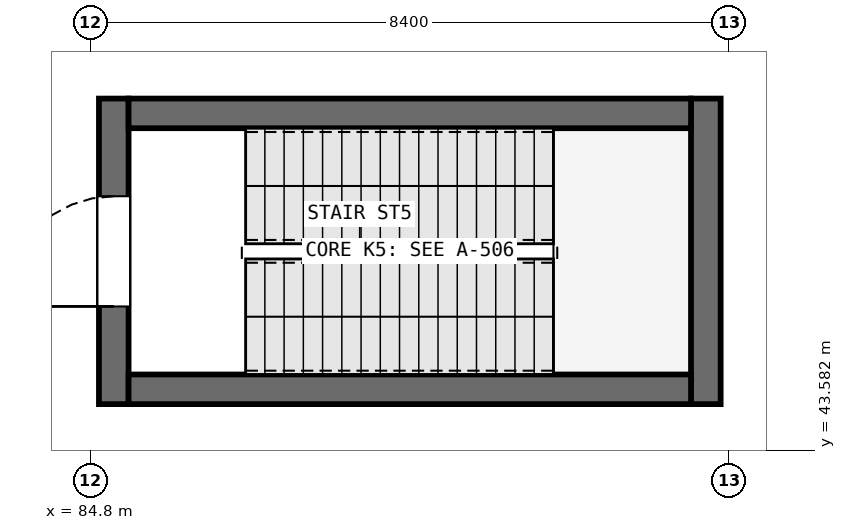
"""IFC4 building model, lengths in metres.
Left out: names, types, materials, properties, quantities, classifications, styles, units other than length and angle.
Written with IfcOpenShell. Run it as: python <this file> out.ifc"""

import sys

from ifc_helpers import new_model, si_unit, direction, frame, frame_2d, origin, place, context, subcontext, project, spatial, rectangle, extrude, element, fill, save


model = new_model("IFC4")
c1 = context("Model", 3, precision=1e-05, world=origin(), true_north=direction((0.0, 1.0)))
c2 = subcontext(c1, "Body", "Model", "MODEL_VIEW")
j1 = project(units=[si_unit("LENGTHUNIT", "METRE"), si_unit("PLANEANGLEUNIT", "RADIAN")], contexts=[c1])
p1 = place(None, origin())
s1 = spatial("IfcSite", under=j1, at=p1, CompositionType="ELEMENT")
p2 = place(p1, origin())
s2 = spatial("IfcBuilding", under=s1, at=p2, CompositionType="ELEMENT")
p3 = place(p2, origin())
s3 = spatial("IfcBuildingStorey", under=s2, at=p3, CompositionType="ELEMENT", Elevation=0.0)
p4 = place(p3, frame((85.105, 44.19, 0.0), z_axis=(0.0, 0.0, 1.0), x_axis=(0.0, 1.0, 0.0)))
e1 = element("IfcWall", 1, at=p4, inside=s3, PredefinedType="SHEAR", context=c2, shape_type="SweptSolid", body=[
    extrude(rectangle(XDim=4.02, YDim=0.39, at=frame_2d((2.01, 0.0))), origin(), (0.0, 0.0, 1.0), 5.1),
])
p5 = place(p4, frame((1.285, 0.0, 0.0)))
e2 = element("IfcOpeningElement", 2, at=p5, cuts=e1, PredefinedType="OPENING", context=c2, shape_type="SweptSolid", body=[
    extrude(rectangle(XDim=1.45, YDim=2.2, at=frame_2d((0.725, 1.1))), frame((0.0, 0.205, 0.0), z_axis=(0.0, -1.0, 0.0), x_axis=(1.0, 0.0, 0.0)), (0.0, 0.0, 1.0), 0.41),
])
p6 = place(p3, frame((92.895, 44.19, 0.0), z_axis=(0.0, 0.0, 1.0), x_axis=(0.0, 1.0, 0.0)))
e3 = element("IfcWall", 3, at=p6, inside=s3, PredefinedType="SHEAR", context=c2, shape_type="SweptSolid", body=[
    extrude(rectangle(XDim=4.02, YDim=0.39, at=frame_2d((2.01, 0.0))), origin(), (0.0, 0.0, 1.0), 5.1),
])
for number, where, z_axis, x_axis in (
    (4, (85.3, 44.385, 0.0), (0.0, 0.0, 1.0), (1.0, 0.0, 0.0)),
    (5, (85.3, 48.015, 0.0), (0.0, 0.0, 1.0), (1.0, 0.0, 0.0)),
):
    element("IfcWall", number, at=place(p3, frame(where, z_axis=z_axis, x_axis=x_axis)), inside=s3, PredefinedType="SHEAR", context=c2, shape_type="SweptSolid", body=[
        extrude(rectangle(XDim=7.4, YDim=0.39, at=frame_2d((3.7, 0.0))), origin(), (0.0, 0.0, 1.0), 5.1),
    ])
p7 = place(p5, origin())
e6 = element("IfcDoor", 6, at=p7, inside=s3, OperationType="SINGLE_SWING_LEFT", PredefinedType="DOOR", context=c2, shape_type="SweptSolid", body=[
    extrude(rectangle(XDim=1.45, YDim=2.2, at=frame_2d((0.725, 1.1))), frame((0.0, 0.025, 0.0), z_axis=(0.0, -1.0, 0.0), x_axis=(1.0, 0.0, 0.0)), (0.0, 0.0, 1.0), 0.05),
])
fill(e2, e6)
save(model, sys.argv[1])
